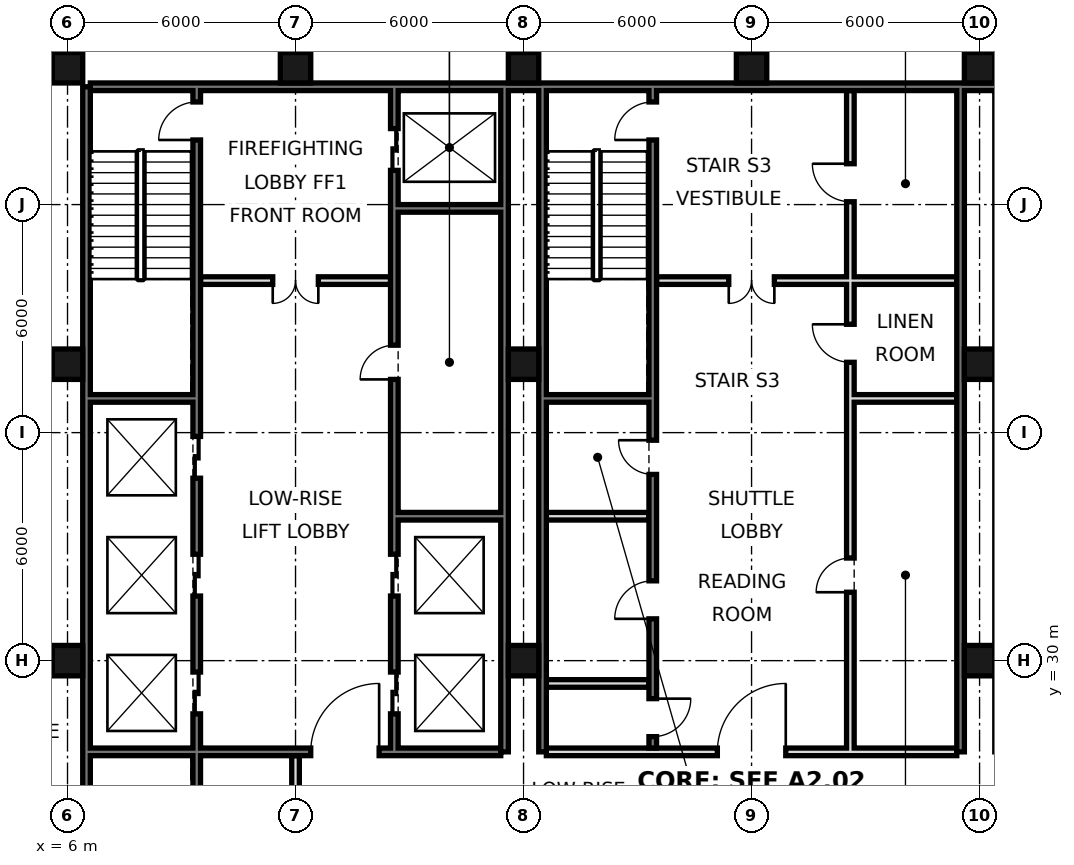
"""IFC4 building model, lengths in metres.
Left out: names, types, materials, properties, quantities, classifications, styles, units other than length and angle.
Written with IfcOpenShell. Run it as: python <this file> out.ifc"""

import sys

from ifc_helpers import new_model, si_unit, direction, frame, frame_2d, origin, origin_2d, place, context, subcontext, project, spatial, rectangle, hollow_rectangle, extrude, element, fill, save


model = new_model("IFC4")
c1 = context("Model", 3, precision=1e-05, world=origin(), true_north=direction((0.0, 1.0)))
c2 = subcontext(c1, "Body", "Model", "MODEL_VIEW")
j1 = project(units=[si_unit("LENGTHUNIT", "METRE"), si_unit("PLANEANGLEUNIT", "RADIAN")], contexts=[c1])
p1 = place(None, origin())
s1 = spatial("IfcSite", under=j1, at=p1, CompositionType="ELEMENT")
p2 = place(p1, origin())
s2 = spatial("IfcBuilding", under=s1, at=p2, CompositionType="ELEMENT")
p3 = place(p2, frame((0.0, 0.0, -9.0)))
s3 = spatial("IfcBuildingStorey", under=s2, at=p3, CompositionType="ELEMENT", Elevation=-9.0)
for number, where, z_axis, x_axis in (
    (1, (6.0, 30.0, 0.0), (0.0, 0.0, 1.0), (1.0, 0.0, 0.0)),
    (2, (6.0, 37.8, 0.0), (0.0, 0.0, 1.0), (1.0, 0.0, 0.0)),
    (3, (6.0, 45.6, 0.0), (0.0, 0.0, 1.0), (1.0, 0.0, 0.0)),
    (4, (12.0, 45.6, 0.0), (0.0, 0.0, 1.0), (1.0, 0.0, 0.0)),
    (5, (18.0, 30.0, 0.0), (0.0, 0.0, 1.0), (1.0, 0.0, 0.0)),
    (6, (18.0, 37.8, 0.0), (0.0, 0.0, 1.0), (1.0, 0.0, 0.0)),
    (7, (18.0, 45.6, 0.0), (0.0, 0.0, 1.0), (1.0, 0.0, 0.0)),
    (8, (24.0, 45.6, 0.0), (0.0, 0.0, 1.0), (1.0, 0.0, 0.0)),
    (9, (30.0, 30.0, 0.0), (0.0, 0.0, 1.0), (1.0, 0.0, 0.0)),
    (10, (30.0, 37.8, 0.0), (0.0, 0.0, 1.0), (1.0, 0.0, 0.0)),
    (11, (30.0, 45.6, 0.0), (0.0, 0.0, 1.0), (1.0, 0.0, 0.0)),
):
    element("IfcColumn", number, at=place(p3, frame(where, z_axis=z_axis, x_axis=x_axis)), inside=s3, PredefinedType="COLUMN", context=c2, shape_type="SweptSolid", body=[
        extrude(hollow_rectangle(XDim=0.8, YDim=0.8, WallThickness=0.07, at=origin_2d()), origin(), (0.0, 0.0, 1.0), 4.5),
    ])
p4 = place(p3, frame((6.5, 21.6, 0.0), z_axis=(0.0, 0.0, 1.0), x_axis=(0.0, 1.0, 0.0)))
e12 = element("IfcWall", 12, at=p4, inside=s3, PredefinedType="SOLIDWALL", context=c2, shape_type="SweptSolid", body=[
    extrude(rectangle(XDim=23.5, YDim=0.2, at=frame_2d((11.75, 0.0))), origin(), (0.0, 0.0, 1.0), 4.14),
])
p5 = place(p3, frame((6.6, 45.1, 0.0), z_axis=(0.0, 0.0, 1.0), x_axis=(1.0, 0.0, 0.0)))
e13 = element("IfcWall", 13, at=p5, inside=s3, PredefinedType="SOLIDWALL", context=c2, shape_type="SweptSolid", body=[
    extrude(rectangle(XDim=34.8, YDim=0.2, at=frame_2d((17.4, 0.0))), origin(), (0.0, 0.0, 1.0), 4.14),
])
for number, where, z_axis, x_axis in (
    (14, (17.5, 27.6, 0.0), (0.0, 0.0, 1.0), (0.0, 1.0, 0.0)),
    (15, (18.5, 27.6, 0.0), (0.0, 0.0, 1.0), (0.0, 1.0, 0.0)),
    (16, (29.5, 27.6, 0.0), (0.0, 0.0, 1.0), (0.0, 1.0, 0.0)),
):
    element("IfcWall", number, at=place(p3, frame(where, z_axis=z_axis, x_axis=x_axis)), inside=s3, PredefinedType="SOLIDWALL", context=c2, shape_type="SweptSolid", body=[
        extrude(rectangle(XDim=17.5, YDim=0.2, at=frame_2d((8.75, 0.0))), origin(), (0.0, 0.0, 1.0), 4.14),
    ])
p6 = place(p3, frame((12.0, 21.5, 0.0), z_axis=(0.0, 0.0, 1.0), x_axis=(0.0, 1.0, 0.0)))
e17 = element("IfcWall", 17, at=p6, inside=s3, PredefinedType="PARTITIONING", context=c2, shape_type="SweptSolid", body=[
    extrude(rectangle(XDim=6.0, YDim=0.2, at=frame_2d((3.0, 0.0))), origin(), (0.0, 0.0, 1.0), 3.04),
])
p7 = place(p3, frame((14.6, 27.7, 0.0), z_axis=(0.0, 0.0, 1.0), x_axis=(0.0, 1.0, 0.0)))
e18 = element("IfcWall", 18, at=p7, inside=s3, PredefinedType="SOLIDWALL", context=c2, shape_type="SweptSolid", body=[
    extrude(rectangle(XDim=17.3, YDim=0.2, at=frame_2d((8.65, 0.0))), origin(), (0.0, 0.0, 1.0), 4.14),
])
p8 = place(p7, frame((0.9, 0.0, 0.0)))
e19 = element("IfcOpeningElement", 19, at=p8, cuts=e18, PredefinedType="OPENING", context=c2, shape_type="SweptSolid", body=[
    extrude(rectangle(XDim=1.1, YDim=2.1, at=frame_2d((0.55, 1.05))), frame((0.0, 0.11, 0.0), z_axis=(0.0, -1.0, 0.0), x_axis=(1.0, 0.0, 0.0)), (0.0, 0.0, 1.0), 0.22),
])
p9 = place(p7, frame((4.0, 0.0, 0.0)))
e20 = element("IfcOpeningElement", 20, at=p9, cuts=e18, PredefinedType="OPENING", context=c2, shape_type="SweptSolid", body=[
    extrude(rectangle(XDim=1.1, YDim=2.1, at=frame_2d((0.55, 1.05))), frame((0.0, 0.11, 0.0), z_axis=(0.0, -1.0, 0.0), x_axis=(1.0, 0.0, 0.0)), (0.0, 0.0, 1.0), 0.22),
])
p10 = place(p7, frame((15.2, 0.0, 0.0)))
e21 = element("IfcOpeningElement", 21, at=p10, cuts=e18, PredefinedType="OPENING", context=c2, shape_type="SweptSolid", body=[
    extrude(rectangle(XDim=1.1, YDim=2.1, at=frame_2d((0.55, 1.05))), frame((0.0, 0.11, 0.0), z_axis=(0.0, -1.0, 0.0), x_axis=(1.0, 0.0, 0.0)), (0.0, 0.0, 1.0), 0.22),
])
p11 = place(p7, frame((9.7, 0.0, 0.0)))
e22 = element("IfcOpeningElement", 22, at=p11, cuts=e18, PredefinedType="OPENING", context=c2, shape_type="SweptSolid", body=[
    extrude(rectangle(XDim=0.9, YDim=2.1, at=frame_2d((0.45, 1.05))), frame((0.0, 0.11, 0.0), z_axis=(0.0, -1.0, 0.0), x_axis=(1.0, 0.0, 0.0)), (0.0, 0.0, 1.0), 0.22),
])
p12 = place(p3, frame((21.4, 27.7, 0.0), z_axis=(0.0, 0.0, 1.0), x_axis=(0.0, 1.0, 0.0)))
e23 = element("IfcWall", 23, at=p12, inside=s3, PredefinedType="SOLIDWALL", context=c2, shape_type="SweptSolid", body=[
    extrude(rectangle(XDim=17.3, YDim=0.2, at=frame_2d((8.65, 0.0))), origin(), (0.0, 0.0, 1.0), 4.14),
])
p13 = place(p12, frame((0.3, 0.0, 0.0)))
e24 = element("IfcOpeningElement", 24, at=p13, cuts=e23, PredefinedType="OPENING", context=c2, shape_type="SweptSolid", body=[
    extrude(rectangle(XDim=1.0, YDim=2.1, at=frame_2d((0.5, 1.05))), frame((0.0, 0.11, 0.0), z_axis=(0.0, -1.0, 0.0), x_axis=(1.0, 0.0, 0.0)), (0.0, 0.0, 1.0), 0.22),
])
p14 = place(p12, frame((3.4, 0.0, 0.0)))
e25 = element("IfcOpeningElement", 25, at=p14, cuts=e23, PredefinedType="OPENING", context=c2, shape_type="SweptSolid", body=[
    extrude(rectangle(XDim=1.0, YDim=2.1, at=frame_2d((0.5, 1.05))), frame((0.0, 0.11, 0.0), z_axis=(0.0, -1.0, 0.0), x_axis=(1.0, 0.0, 0.0)), (0.0, 0.0, 1.0), 0.22),
])
p15 = place(p12, frame((16.0, 0.0, 0.0)))
e26 = element("IfcOpeningElement", 26, at=p15, cuts=e23, PredefinedType="OPENING", context=c2, shape_type="SweptSolid", body=[
    extrude(rectangle(XDim=1.0, YDim=2.1, at=frame_2d((0.5, 1.05))), frame((0.0, 0.11, 0.0), z_axis=(0.0, -1.0, 0.0), x_axis=(1.0, 0.0, 0.0)), (0.0, 0.0, 1.0), 0.22),
])
p16 = place(p12, frame((7.2, 0.0, 0.0)))
e27 = element("IfcOpeningElement", 27, at=p16, cuts=e23, PredefinedType="OPENING", context=c2, shape_type="SweptSolid", body=[
    extrude(rectangle(XDim=0.9, YDim=2.1, at=frame_2d((0.45, 1.05))), frame((0.0, 0.11, 0.0), z_axis=(0.0, -1.0, 0.0), x_axis=(1.0, 0.0, 0.0)), (0.0, 0.0, 1.0), 0.22),
])
p17 = place(p3, frame((26.6, 27.7, 0.0), z_axis=(0.0, 0.0, 1.0), x_axis=(0.0, 1.0, 0.0)))
e28 = element("IfcWall", 28, at=p17, inside=s3, PredefinedType="SOLIDWALL", context=c2, shape_type="SweptSolid", body=[
    extrude(rectangle(XDim=17.3, YDim=0.2, at=frame_2d((8.65, 0.0))), origin(), (0.0, 0.0, 1.0), 4.14),
])
p18 = place(p17, frame((4.1, 0.0, 0.0)))
e29 = element("IfcOpeningElement", 29, at=p18, cuts=e28, PredefinedType="OPENING", context=c2, shape_type="SweptSolid", body=[
    extrude(rectangle(XDim=0.9, YDim=2.1, at=frame_2d((0.45, 1.05))), frame((0.0, 0.11, 0.0), z_axis=(0.0, -1.0, 0.0), x_axis=(1.0, 0.0, 0.0)), (0.0, 0.0, 1.0), 0.22),
])
p19 = place(p17, frame((10.15, 0.0, 0.0)))
e30 = element("IfcOpeningElement", 30, at=p19, cuts=e28, PredefinedType="OPENING", context=c2, shape_type="SweptSolid", body=[
    extrude(rectangle(XDim=1.0, YDim=2.1, at=frame_2d((0.5, 1.05))), frame((0.0, 0.11, 0.0), z_axis=(0.0, -1.0, 0.0), x_axis=(1.0, 0.0, 0.0)), (0.0, 0.0, 1.0), 0.22),
])
p20 = place(p17, frame((14.375, 0.0, 0.0)))
e31 = element("IfcOpeningElement", 31, at=p20, cuts=e28, PredefinedType="OPENING", context=c2, shape_type="SweptSolid", body=[
    extrude(rectangle(XDim=1.0, YDim=2.1, at=frame_2d((0.5, 1.05))), frame((0.0, 0.11, 0.0), z_axis=(0.0, -1.0, 0.0), x_axis=(1.0, 0.0, 0.0)), (0.0, 0.0, 1.0), 0.22),
])
p21 = place(p3, frame((9.4, 21.5, 0.0), z_axis=(0.0, 0.0, 1.0), x_axis=(0.0, 1.0, 0.0)))
e32 = element("IfcWall", 32, at=p21, inside=s3, PredefinedType="SOLIDWALL", context=c2, shape_type="SweptSolid", body=[
    extrude(rectangle(XDim=23.5, YDim=0.2, at=frame_2d((11.75, 0.0))), origin(), (0.0, 0.0, 1.0), 3.04),
])
p22 = place(p21, frame((7.1, 0.0, 0.0)))
e33 = element("IfcOpeningElement", 33, at=p22, cuts=e32, PredefinedType="OPENING", context=c2, shape_type="SweptSolid", body=[
    extrude(rectangle(XDim=1.1, YDim=2.1, at=frame_2d((0.55, 1.05))), frame((0.0, 0.11, 0.0), z_axis=(0.0, -1.0, 0.0), x_axis=(1.0, 0.0, 0.0)), (0.0, 0.0, 1.0), 0.22),
])
p23 = place(p21, frame((10.2, 0.0, 0.0)))
e34 = element("IfcOpeningElement", 34, at=p23, cuts=e32, PredefinedType="OPENING", context=c2, shape_type="SweptSolid", body=[
    extrude(rectangle(XDim=1.1, YDim=2.1, at=frame_2d((0.55, 1.05))), frame((0.0, 0.11, 0.0), z_axis=(0.0, -1.0, 0.0), x_axis=(1.0, 0.0, 0.0)), (0.0, 0.0, 1.0), 0.22),
])
p24 = place(p21, frame((13.3, 0.0, 0.0)))
e35 = element("IfcOpeningElement", 35, at=p24, cuts=e32, PredefinedType="OPENING", context=c2, shape_type="SweptSolid", body=[
    extrude(rectangle(XDim=1.1, YDim=2.1, at=frame_2d((0.55, 1.05))), frame((0.0, 0.11, 0.0), z_axis=(0.0, -1.0, 0.0), x_axis=(1.0, 0.0, 0.0)), (0.0, 0.0, 1.0), 0.22),
])
p25 = place(p21, frame((22.2, 0.0, 0.0)))
e36 = element("IfcOpeningElement", 36, at=p25, cuts=e32, PredefinedType="OPENING", context=c2, shape_type="SweptSolid", body=[
    extrude(rectangle(XDim=1.0, YDim=2.1, at=frame_2d((0.5, 1.05))), frame((0.0, 0.11, 0.0), z_axis=(0.0, -1.0, 0.0), x_axis=(1.0, 0.0, 0.0)), (0.0, 0.0, 1.0), 0.22),
])
p26 = place(p21, frame((0.275, 0.0, 0.0)))
e37 = element("IfcOpeningElement", 37, at=p26, cuts=e32, PredefinedType="OPENING", context=c2, shape_type="SweptSolid", body=[
    extrude(rectangle(XDim=0.9, YDim=2.1, at=frame_2d((0.45, 1.05))), frame((0.0, 0.11, 0.0), z_axis=(0.0, -1.0, 0.0), x_axis=(1.0, 0.0, 0.0)), (0.0, 0.0, 1.0), 0.22),
])
p27 = place(p3, frame((18.6, 27.6, 0.0), z_axis=(0.0, 0.0, 1.0), x_axis=(1.0, 0.0, 0.0)))
e38 = element("IfcWall", 38, at=p27, inside=s3, PredefinedType="SOLIDWALL", context=c2, shape_type="SweptSolid", body=[
    extrude(rectangle(XDim=10.8, YDim=0.2, at=frame_2d((5.4, 0.0))), origin(), (0.0, 0.0, 1.0), 4.14),
])
p28 = place(p27, frame((4.5, 0.0, 0.0)))
e39 = element("IfcOpeningElement", 39, at=p28, cuts=e38, PredefinedType="OPENING", context=c2, shape_type="SweptSolid", body=[
    extrude(rectangle(XDim=1.8, YDim=2.1, at=frame_2d((0.9, 1.05))), frame((0.0, 0.11, 0.0), z_axis=(0.0, -1.0, 0.0), x_axis=(1.0, 0.0, 0.0)), (0.0, 0.0, 1.0), 0.22),
])
p29 = place(p3, frame((6.6, 27.6, 0.0), z_axis=(0.0, 0.0, 1.0), x_axis=(1.0, 0.0, 0.0)))
e40 = element("IfcWall", 40, at=p29, inside=s3, PredefinedType="SOLIDWALL", context=c2, shape_type="SweptSolid", body=[
    extrude(rectangle(XDim=10.8, YDim=0.2, at=frame_2d((5.4, 0.0))), origin(), (0.0, 0.0, 1.0), 4.14),
])
p30 = place(p29, frame((5.8, 0.0, 0.0)))
e41 = element("IfcOpeningElement", 41, at=p30, cuts=e40, PredefinedType="OPENING", context=c2, shape_type="SweptSolid", body=[
    extrude(rectangle(XDim=1.8, YDim=2.1, at=frame_2d((0.9, 1.05))), frame((0.0, 0.11, 0.0), z_axis=(0.0, -1.0, 0.0), x_axis=(1.0, 0.0, 0.0)), (0.0, 0.0, 1.0), 0.22),
])
p31 = place(p3, frame((18.6, 29.4, 0.0), z_axis=(0.0, 0.0, 1.0), x_axis=(1.0, 0.0, 0.0)))
e42 = element("IfcWall", 42, at=p31, inside=s3, PredefinedType="PARTITIONING", context=c2, shape_type="SweptSolid", body=[
    extrude(rectangle(XDim=2.7, YDim=0.2, at=frame_2d((1.35, 0.0))), origin(), (0.0, 0.0, 1.0), 4.14),
])
for number, where, z_axis, x_axis in (
    (43, (14.7, 33.8, 0.0), (0.0, 0.0, 1.0), (1.0, 0.0, 0.0)),
    (44, (18.6, 33.8, 0.0), (0.0, 0.0, 1.0), (1.0, 0.0, 0.0)),
    (45, (18.6, 36.9, 0.0), (0.0, 0.0, 1.0), (1.0, 0.0, 0.0)),
    (46, (26.7, 36.9, 0.0), (0.0, 0.0, 1.0), (1.0, 0.0, 0.0)),
    (47, (6.6, 36.9, 0.0), (0.0, 0.0, 1.0), (1.0, 0.0, 0.0)),
):
    element("IfcWall", number, at=place(p3, frame(where, z_axis=z_axis, x_axis=x_axis)), inside=s3, PredefinedType="SOLIDWALL", context=c2, shape_type="SweptSolid", body=[
        extrude(rectangle(XDim=2.7, YDim=0.2, at=frame_2d((1.35, 0.0))), origin(), (0.0, 0.0, 1.0), 4.14),
    ])
p32 = place(p3, frame((21.5, 40.0, 0.0), z_axis=(0.0, 0.0, 1.0), x_axis=(1.0, 0.0, 0.0)))
e48 = element("IfcWall", 48, at=p32, inside=s3, PredefinedType="PARTITIONING", context=c2, shape_type="SweptSolid", body=[
    extrude(rectangle(XDim=7.9, YDim=0.2, at=frame_2d((3.95, 0.0))), origin(), (0.0, 0.0, 1.0), 4.14),
])
p33 = place(p32, frame((1.9, 0.0, 0.0)))
e49 = element("IfcOpeningElement", 49, at=p33, cuts=e48, PredefinedType="OPENING", context=c2, shape_type="SweptSolid", body=[
    extrude(rectangle(XDim=1.2, YDim=2.1, at=frame_2d((0.6, 1.05))), frame((0.0, 0.11, 0.0), z_axis=(0.0, -1.0, 0.0), x_axis=(1.0, 0.0, 0.0)), (0.0, 0.0, 1.0), 0.22),
])
p34 = place(p3, frame((9.5, 40.0, 0.0), z_axis=(0.0, 0.0, 1.0), x_axis=(1.0, 0.0, 0.0)))
e50 = element("IfcWall", 50, at=p34, inside=s3, PredefinedType="PARTITIONING", context=c2, shape_type="SweptSolid", body=[
    extrude(rectangle(XDim=5.0, YDim=0.2, at=frame_2d((2.5, 0.0))), origin(), (0.0, 0.0, 1.0), 4.14),
])
p35 = place(p34, frame((1.9, 0.0, 0.0)))
e51 = element("IfcOpeningElement", 51, at=p35, cuts=e50, PredefinedType="OPENING", context=c2, shape_type="SweptSolid", body=[
    extrude(rectangle(XDim=1.2, YDim=2.1, at=frame_2d((0.6, 1.05))), frame((0.0, 0.11, 0.0), z_axis=(0.0, -1.0, 0.0), x_axis=(1.0, 0.0, 0.0)), (0.0, 0.0, 1.0), 0.22),
])
p36 = place(p3, frame((14.7, 41.9, 0.0), z_axis=(0.0, 0.0, 1.0), x_axis=(1.0, 0.0, 0.0)))
e52 = element("IfcWall", 52, at=p36, inside=s3, PredefinedType="SOLIDWALL", context=c2, shape_type="SweptSolid", body=[
    extrude(rectangle(XDim=2.7, YDim=0.2, at=frame_2d((1.35, 0.0))), origin(), (0.0, 0.0, 1.0), 4.14),
])
p37 = place(p30, frame((1.8, 0.0, 0.0), z_axis=(0.0, 0.0, 1.0), x_axis=(-1.0, 0.0, 0.0)))
e53 = element("IfcDoor", 53, at=p37, inside=s3, OperationType="SINGLE_SWING_LEFT", PredefinedType="DOOR", context=c2, shape_type="SweptSolid", body=[
    extrude(rectangle(XDim=1.8, YDim=2.1, at=frame_2d((0.9, 1.05))), frame((0.0, 0.025, 0.0), z_axis=(0.0, -1.0, 0.0), x_axis=(1.0, 0.0, 0.0)), (0.0, 0.0, 1.0), 0.05),
])
fill(e41, e53)
p38 = place(p35, frame((1.2, 0.0, 0.0), z_axis=(0.0, 0.0, 1.0), x_axis=(-1.0, 0.0, 0.0)))
e54 = element("IfcDoor", 54, at=p38, inside=s3, OperationType="DOUBLE_DOOR_SINGLE_SWING", PredefinedType="DOOR", context=c2, shape_type="SweptSolid", body=[
    extrude(rectangle(XDim=1.2, YDim=2.1, at=frame_2d((0.6, 1.05))), frame((0.0, 0.025, 0.0), z_axis=(0.0, -1.0, 0.0), x_axis=(1.0, 0.0, 0.0)), (0.0, 0.0, 1.0), 0.05),
])
fill(e51, e54)
p39 = place(p28, frame((1.8, 0.0, 0.0), z_axis=(0.0, 0.0, 1.0), x_axis=(-1.0, 0.0, 0.0)))
e55 = element("IfcDoor", 55, at=p39, inside=s3, OperationType="SINGLE_SWING_LEFT", PredefinedType="DOOR", context=c2, shape_type="SweptSolid", body=[
    extrude(rectangle(XDim=1.8, YDim=2.1, at=frame_2d((0.9, 1.05))), frame((0.0, 0.025, 0.0), z_axis=(0.0, -1.0, 0.0), x_axis=(1.0, 0.0, 0.0)), (0.0, 0.0, 1.0), 0.05),
])
fill(e39, e55)
p40 = place(p33, frame((1.2, 0.0, 0.0), z_axis=(0.0, 0.0, 1.0), x_axis=(-1.0, 0.0, 0.0)))
e56 = element("IfcDoor", 56, at=p40, inside=s3, OperationType="DOUBLE_DOOR_SINGLE_SWING", PredefinedType="DOOR", context=c2, shape_type="SweptSolid", body=[
    extrude(rectangle(XDim=1.2, YDim=2.1, at=frame_2d((0.6, 1.05))), frame((0.0, 0.025, 0.0), z_axis=(0.0, -1.0, 0.0), x_axis=(1.0, 0.0, 0.0)), (0.0, 0.0, 1.0), 0.05),
])
fill(e49, e56)
p41 = place(p8, origin())
e57 = element("IfcDoor", 57, at=p41, inside=s3, OperationType="DOUBLE_DOOR_SLIDING", PredefinedType="DOOR", context=c2, shape_type="SweptSolid", body=[
    extrude(rectangle(XDim=1.1, YDim=2.1, at=frame_2d((0.55, 1.05))), frame((0.0, 0.025, 0.0), z_axis=(0.0, -1.0, 0.0), x_axis=(1.0, 0.0, 0.0)), (0.0, 0.0, 1.0), 0.05),
])
fill(e19, e57)
p42 = place(p9, origin())
e58 = element("IfcDoor", 58, at=p42, inside=s3, OperationType="DOUBLE_DOOR_SLIDING", PredefinedType="DOOR", context=c2, shape_type="SweptSolid", body=[
    extrude(rectangle(XDim=1.1, YDim=2.1, at=frame_2d((0.55, 1.05))), frame((0.0, 0.025, 0.0), z_axis=(0.0, -1.0, 0.0), x_axis=(1.0, 0.0, 0.0)), (0.0, 0.0, 1.0), 0.05),
])
fill(e20, e58)
p43 = place(p10, origin())
e59 = element("IfcDoor", 59, at=p43, inside=s3, OperationType="DOUBLE_DOOR_SLIDING", PredefinedType="DOOR", context=c2, shape_type="SweptSolid", body=[
    extrude(rectangle(XDim=1.1, YDim=2.1, at=frame_2d((0.55, 1.05))), frame((0.0, 0.025, 0.0), z_axis=(0.0, -1.0, 0.0), x_axis=(1.0, 0.0, 0.0)), (0.0, 0.0, 1.0), 0.05),
])
fill(e21, e59)
p44 = place(p22, origin())
e60 = element("IfcDoor", 60, at=p44, inside=s3, OperationType="DOUBLE_DOOR_SLIDING", PredefinedType="DOOR", context=c2, shape_type="SweptSolid", body=[
    extrude(rectangle(XDim=1.1, YDim=2.1, at=frame_2d((0.55, 1.05))), frame((0.0, 0.025, 0.0), z_axis=(0.0, -1.0, 0.0), x_axis=(1.0, 0.0, 0.0)), (0.0, 0.0, 1.0), 0.05),
])
fill(e33, e60)
p45 = place(p23, origin())
e61 = element("IfcDoor", 61, at=p45, inside=s3, OperationType="DOUBLE_DOOR_SLIDING", PredefinedType="DOOR", context=c2, shape_type="SweptSolid", body=[
    extrude(rectangle(XDim=1.1, YDim=2.1, at=frame_2d((0.55, 1.05))), frame((0.0, 0.025, 0.0), z_axis=(0.0, -1.0, 0.0), x_axis=(1.0, 0.0, 0.0)), (0.0, 0.0, 1.0), 0.05),
])
fill(e34, e61)
p46 = place(p24, origin())
e62 = element("IfcDoor", 62, at=p46, inside=s3, OperationType="DOUBLE_DOOR_SLIDING", PredefinedType="DOOR", context=c2, shape_type="SweptSolid", body=[
    extrude(rectangle(XDim=1.1, YDim=2.1, at=frame_2d((0.55, 1.05))), frame((0.0, 0.025, 0.0), z_axis=(0.0, -1.0, 0.0), x_axis=(1.0, 0.0, 0.0)), (0.0, 0.0, 1.0), 0.05),
])
fill(e35, e62)
p47 = place(p13, origin())
e63 = element("IfcDoor", 63, at=p47, inside=s3, OperationType="SINGLE_SWING_RIGHT", PredefinedType="DOOR", context=c2, shape_type="SweptSolid", body=[
    extrude(rectangle(XDim=1.0, YDim=2.1, at=frame_2d((0.5, 1.05))), frame((0.0, 0.025, 0.0), z_axis=(0.0, -1.0, 0.0), x_axis=(1.0, 0.0, 0.0)), (0.0, 0.0, 1.0), 0.05),
])
fill(e24, e63)
p48 = place(p14, origin())
e64 = element("IfcDoor", 64, at=p48, inside=s3, OperationType="SINGLE_SWING_LEFT", PredefinedType="DOOR", context=c2, shape_type="SweptSolid", body=[
    extrude(rectangle(XDim=1.0, YDim=2.1, at=frame_2d((0.5, 1.05))), frame((0.0, 0.025, 0.0), z_axis=(0.0, -1.0, 0.0), x_axis=(1.0, 0.0, 0.0)), (0.0, 0.0, 1.0), 0.05),
])
fill(e25, e64)
p49 = place(p25, origin())
e65 = element("IfcDoor", 65, at=p49, inside=s3, OperationType="SINGLE_SWING_LEFT", PredefinedType="DOOR", context=c2, shape_type="SweptSolid", body=[
    extrude(rectangle(XDim=1.0, YDim=2.1, at=frame_2d((0.5, 1.05))), frame((0.0, 0.025, 0.0), z_axis=(0.0, -1.0, 0.0), x_axis=(1.0, 0.0, 0.0)), (0.0, 0.0, 1.0), 0.05),
])
fill(e36, e65)
p50 = place(p15, origin())
e66 = element("IfcDoor", 66, at=p50, inside=s3, OperationType="SINGLE_SWING_LEFT", PredefinedType="DOOR", context=c2, shape_type="SweptSolid", body=[
    extrude(rectangle(XDim=1.0, YDim=2.1, at=frame_2d((0.5, 1.05))), frame((0.0, 0.025, 0.0), z_axis=(0.0, -1.0, 0.0), x_axis=(1.0, 0.0, 0.0)), (0.0, 0.0, 1.0), 0.05),
])
fill(e26, e66)
p51 = place(p11, origin())
e67 = element("IfcDoor", 67, at=p51, inside=s3, OperationType="SINGLE_SWING_LEFT", PredefinedType="DOOR", context=c2, shape_type="SweptSolid", body=[
    extrude(rectangle(XDim=0.9, YDim=2.1, at=frame_2d((0.45, 1.05))), frame((0.0, 0.025, 0.0), z_axis=(0.0, -1.0, 0.0), x_axis=(1.0, 0.0, 0.0)), (0.0, 0.0, 1.0), 0.05),
])
fill(e22, e67)
p52 = place(p16, frame((0.9, 0.0, 0.0), z_axis=(0.0, 0.0, 1.0), x_axis=(-1.0, 0.0, 0.0)))
e68 = element("IfcDoor", 68, at=p52, inside=s3, OperationType="SINGLE_SWING_LEFT", PredefinedType="DOOR", context=c2, shape_type="SweptSolid", body=[
    extrude(rectangle(XDim=0.9, YDim=2.1, at=frame_2d((0.45, 1.05))), frame((0.0, 0.025, 0.0), z_axis=(0.0, -1.0, 0.0), x_axis=(1.0, 0.0, 0.0)), (0.0, 0.0, 1.0), 0.05),
])
fill(e27, e68)
p53 = place(p18, origin())
e69 = element("IfcDoor", 69, at=p53, inside=s3, OperationType="SINGLE_SWING_LEFT", PredefinedType="DOOR", context=c2, shape_type="SweptSolid", body=[
    extrude(rectangle(XDim=0.9, YDim=2.1, at=frame_2d((0.45, 1.05))), frame((0.0, 0.025, 0.0), z_axis=(0.0, -1.0, 0.0), x_axis=(1.0, 0.0, 0.0)), (0.0, 0.0, 1.0), 0.05),
])
fill(e29, e69)
p54 = place(p19, frame((1.0, 0.0, 0.0), z_axis=(0.0, 0.0, 1.0), x_axis=(-1.0, 0.0, 0.0)))
e70 = element("IfcDoor", 70, at=p54, inside=s3, OperationType="SINGLE_SWING_LEFT", PredefinedType="DOOR", context=c2, shape_type="SweptSolid", body=[
    extrude(rectangle(XDim=1.0, YDim=2.1, at=frame_2d((0.5, 1.05))), frame((0.0, 0.025, 0.0), z_axis=(0.0, -1.0, 0.0), x_axis=(1.0, 0.0, 0.0)), (0.0, 0.0, 1.0), 0.05),
])
fill(e30, e70)
p55 = place(p20, frame((1.0, 0.0, 0.0), z_axis=(0.0, 0.0, 1.0), x_axis=(-1.0, 0.0, 0.0)))
e71 = element("IfcDoor", 71, at=p55, inside=s3, OperationType="SINGLE_SWING_LEFT", PredefinedType="DOOR", context=c2, shape_type="SweptSolid", body=[
    extrude(rectangle(XDim=1.0, YDim=2.1, at=frame_2d((0.5, 1.05))), frame((0.0, 0.025, 0.0), z_axis=(0.0, -1.0, 0.0), x_axis=(1.0, 0.0, 0.0)), (0.0, 0.0, 1.0), 0.05),
])
fill(e31, e71)
save(model, sys.argv[1])
